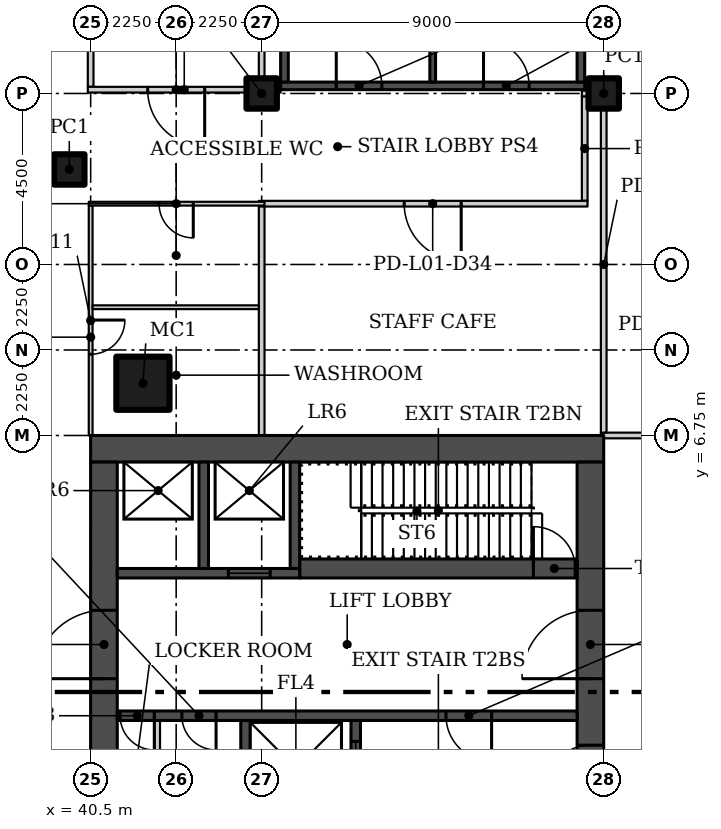
"""IFC4 building model, lengths in metres.
Left out: names, types, materials, properties, quantities, classifications, styles, units other than length and angle.
Written with IfcOpenShell. Run it as: python <this file> out.ifc"""

import sys

from ifc_helpers import new_model, si_unit, direction, frame, frame_2d, origin, origin_2d, place, context, subcontext, project, spatial, rectangle, hollow_rectangle, extrude, element, fill, save


model = new_model("IFC4")
c1 = context("Model", 3, precision=1e-05, world=origin(), true_north=direction((0.0, 1.0)))
c2 = subcontext(c1, "Body", "Model", "MODEL_VIEW")
j1 = project(units=[si_unit("LENGTHUNIT", "METRE"), si_unit("PLANEANGLEUNIT", "RADIAN")], contexts=[c1])
p1 = place(None, origin())
s1 = spatial("IfcSite", under=j1, at=p1, CompositionType="ELEMENT")
p2 = place(p1, origin())
s2 = spatial("IfcBuilding", under=s1, at=p2, CompositionType="ELEMENT")
p3 = place(p2, frame((0.0, 0.0, 6.5)))
s3 = spatial("IfcBuildingStorey", under=s2, at=p3, CompositionType="ELEMENT", Elevation=6.5)
p4 = place(p3, frame((41.875, 8.125, 0.0)))
e1 = element("IfcColumn", 1, at=p4, inside=s3, PredefinedType="COLUMN", context=c2, shape_type="SweptSolid", body=[
    extrude(hollow_rectangle(XDim=1.4, YDim=1.4, WallThickness=0.06, at=origin_2d()), origin(), (0.0, 0.0, 1.0), 5.6),
])
for number, where in (
    (2, (39.938, 13.75, 0.0)),
    (3, (45.0, 15.75, 0.0)),
    (4, (54.0, 15.75, 0.0)),
):
    element("IfcColumn", number, at=place(p3, frame(where)), inside=s3, PredefinedType="COLUMN", context=c2, shape_type="SweptSolid", body=[
        extrude(hollow_rectangle(XDim=0.8, YDim=0.8, WallThickness=0.03, at=origin_2d()), origin(), (0.0, 0.0, 1.0), 5.6),
    ])
p5 = place(p3, frame((40.5, 15.925, 0.0), z_axis=(0.0, 0.0, 1.0), x_axis=(0.0, 1.0, 0.0)))
e5 = element("IfcWall", 5, at=p5, inside=s3, PredefinedType="PARTITIONING", context=c2, shape_type="SweptSolid", body=[
    extrude(rectangle(XDim=17.73, YDim=0.15, at=frame_2d((8.865, 0.0))), origin(), (0.0, 0.0, 1.0), 5.6),
])
p6 = place(p5, frame((13.175, 0.0, 0.0)))
e6 = element("IfcOpeningElement", 6, at=p6, cuts=e5, PredefinedType="OPENING", context=c2, shape_type="SweptSolid", body=[
    extrude(rectangle(XDim=1.5, YDim=2.1, at=frame_2d((0.75, 1.05))), frame((0.0, 0.085, 0.0), z_axis=(0.0, -1.0, 0.0), x_axis=(1.0, 0.0, 0.0)), (0.0, 0.0, 1.0), 0.17),
])
p7 = place(p3, frame((40.5, 12.8, 0.0), z_axis=(0.0, 0.0, 1.0), x_axis=(0.0, -1.0, 0.0)))
e7 = element("IfcWall", 7, at=p7, inside=s3, PredefinedType="PARTITIONING", context=c2, shape_type="SweptSolid", body=[
    extrude(rectangle(XDim=6.05, YDim=0.1, at=frame_2d((3.025, 0.0))), origin(), (0.0, 0.0, 1.0), 5.6),
])
p8 = place(p7, frame((3.012, 0.0, 0.0)))
e8 = element("IfcOpeningElement", 8, at=p8, cuts=e7, PredefinedType="OPENING", context=c2, shape_type="SweptSolid", body=[
    extrude(rectangle(XDim=0.9, YDim=2.1, at=frame_2d((0.45, 1.05))), frame((0.0, 0.06, 0.0), z_axis=(0.0, -1.0, 0.0), x_axis=(1.0, 0.0, 0.0)), (0.0, 0.0, 1.0), 0.12),
])
p9 = place(p3, frame((62.905, 6.75, 0.0), z_axis=(0.0, 0.0, 1.0), x_axis=(-1.0, 0.0, 0.0)))
e9 = element("IfcWall", 9, at=p9, inside=s3, PredefinedType="PARTITIONING", context=c2, shape_type="SweptSolid", body=[
    extrude(rectangle(XDim=8.98, YDim=0.15, at=frame_2d((4.49, 0.0))), origin(), (0.0, 0.0, 1.0), 5.6),
])
p10 = place(p9, frame((2.755, 0.0, 0.0)))
e10 = element("IfcOpeningElement", 10, at=p10, cuts=e9, PredefinedType="OPENING", context=c2, shape_type="SweptSolid", body=[
    extrude(rectangle(XDim=1.8, YDim=2.4, at=frame_2d((0.9, 1.2))), frame((0.0, 0.085, 0.0), z_axis=(0.0, -1.0, 0.0), x_axis=(1.0, 0.0, 0.0)), (0.0, 0.0, 1.0), 0.17),
])
p11 = place(p9, frame((6.055, 0.0, 0.0)))
e11 = element("IfcOpeningElement", 11, at=p11, cuts=e9, PredefinedType="OPENING", context=c2, shape_type="SweptSolid", body=[
    extrude(rectangle(XDim=1.8, YDim=2.4, at=frame_2d((0.9, 1.2))), frame((0.0, 0.085, 0.0), z_axis=(0.0, -1.0, 0.0), x_axis=(1.0, 0.0, 0.0)), (0.0, 0.0, 1.0), 0.17),
])
p12 = place(p3, frame((45.5, 15.85, 0.0), z_axis=(0.0, 0.0, 1.0), x_axis=(-1.0, 0.0, 0.0)))
e12 = element("IfcWall", 12, at=p12, inside=s3, PredefinedType="PARTITIONING", context=c2, shape_type="SweptSolid", body=[
    extrude(rectangle(XDim=5.075, YDim=0.15, at=frame_2d((2.538, 0.0))), origin(), (0.0, 0.0, 1.0), 5.6),
])
p13 = place(p12, frame((2.0, 0.0, 0.0)))
e13 = element("IfcOpeningElement", 13, at=p13, cuts=e12, PredefinedType="OPENING", context=c2, shape_type="SweptSolid", body=[
    extrude(rectangle(XDim=1.5, YDim=2.1, at=frame_2d((0.75, 1.05))), frame((0.0, 0.085, 0.0), z_axis=(0.0, -1.0, 0.0), x_axis=(1.0, 0.0, 0.0)), (0.0, 0.0, 1.0), 0.17),
])
p14 = place(p3, frame((53.5, 15.675, 0.0), z_axis=(0.0, 0.0, 1.0), x_axis=(0.0, -1.0, 0.0)))
e14 = element("IfcWall", 14, at=p14, inside=s3, PredefinedType="PARTITIONING", context=c2, shape_type="SweptSolid", body=[
    extrude(rectangle(XDim=2.75, YDim=0.15, at=frame_2d((1.375, 0.0))), origin(), (0.0, 0.0, 1.0), 5.6),
])
p15 = place(p3, frame((53.575, 12.85, 0.0), z_axis=(0.0, 0.0, 1.0), x_axis=(-1.0, 0.0, 0.0)))
e15 = element("IfcWall", 15, at=p15, inside=s3, PredefinedType="PARTITIONING", context=c2, shape_type="SweptSolid", body=[
    extrude(rectangle(XDim=8.65, YDim=0.15, at=frame_2d((4.325, 0.0))), origin(), (0.0, 0.0, 1.0), 5.6),
])
p16 = place(p15, frame((3.325, 0.0, 0.0)))
e16 = element("IfcOpeningElement", 16, at=p16, cuts=e15, PredefinedType="OPENING", context=c2, shape_type="SweptSolid", body=[
    extrude(rectangle(XDim=1.5, YDim=2.1, at=frame_2d((0.75, 1.05))), frame((0.0, 0.085, 0.0), z_axis=(0.0, -1.0, 0.0), x_axis=(1.0, 0.0, 0.0)), (0.0, 0.0, 1.0), 0.17),
])
p17 = place(p3, frame((45.075, 12.85, 0.0), z_axis=(0.0, 0.0, 1.0), x_axis=(-1.0, 0.0, 0.0)))
e17 = element("IfcWall", 17, at=p17, inside=s3, PredefinedType="PARTITIONING", context=c2, shape_type="SweptSolid", body=[
    extrude(rectangle(XDim=4.625, YDim=0.1, at=frame_2d((2.312, 0.0))), origin(), (0.0, 0.0, 1.0), 5.6),
])
p18 = place(p17, frame((1.875, 0.0, 0.0)))
e18 = element("IfcOpeningElement", 18, at=p18, cuts=e17, PredefinedType="OPENING", context=c2, shape_type="SweptSolid", body=[
    extrude(rectangle(XDim=0.9, YDim=2.1, at=frame_2d((0.45, 1.05))), frame((0.0, 0.06, 0.0), z_axis=(0.0, -1.0, 0.0), x_axis=(1.0, 0.0, 0.0)), (0.0, 0.0, 1.0), 0.12),
])
p19 = place(p3, frame((53.425, 15.75, 0.0)))
e19 = element("IfcWall", 19, at=p19, inside=s3, PredefinedType="PARTITIONING", context=c2, shape_type="SweptSolid", body=[
    extrude(rectangle(XDim=0.65, YDim=0.15, at=frame_2d((0.325, 0.0))), origin(), (0.0, 0.0, 1.0), 5.6),
])
p20 = place(p3, frame((54.0, 15.675, 0.0), z_axis=(0.0, 0.0, 1.0), x_axis=(0.0, -1.0, 0.0)))
e20 = element("IfcWall", 20, at=p20, inside=s3, PredefinedType="PARTITIONING", context=c2, shape_type="SweptSolid", body=[
    extrude(rectangle(XDim=8.85, YDim=0.15, at=frame_2d((4.425, 0.0))), origin(), (0.0, 0.0, 1.0), 5.6),
])
p21 = place(p3, frame((45.0, 33.655, 0.0), z_axis=(0.0, 0.0, 1.0), x_axis=(0.0, -1.0, 0.0)))
e21 = element("IfcWall", 21, at=p21, inside=s3, PredefinedType="PARTITIONING", context=c2, shape_type="SweptSolid", body=[
    extrude(rectangle(XDim=17.73, YDim=0.15, at=frame_2d((8.865, 0.0))), origin(), (0.0, 0.0, 1.0), 5.6),
])
p22 = place(p3, frame((45.0, 12.775, 0.0), z_axis=(0.0, 0.0, 1.0), x_axis=(0.0, -1.0, 0.0)))
e22 = element("IfcWall", 22, at=p22, inside=s3, PredefinedType="PARTITIONING", context=c2, shape_type="SweptSolid", body=[
    extrude(rectangle(XDim=6.025, YDim=0.15, at=frame_2d((3.012, 0.0))), origin(), (0.0, 0.0, 1.0), 5.6),
])
p23 = place(p3, frame((44.925, 10.125, 0.0), z_axis=(0.0, 0.0, 1.0), x_axis=(-1.0, 0.0, 0.0)))
e23 = element("IfcWall", 23, at=p23, inside=s3, PredefinedType="PARTITIONING", context=c2, shape_type="SweptSolid", body=[
    extrude(rectangle(XDim=4.375, YDim=0.1, at=frame_2d((2.188, 0.0))), origin(), (0.0, 0.0, 1.0), 5.6),
])
p24 = place(p3, frame((54.0, 6.4, 0.0), z_axis=(0.0, 0.0, 1.0), x_axis=(-1.0, 0.0, 0.0)))
e24 = element("IfcWall", 24, at=p24, inside=s3, PredefinedType="SHEAR", context=c2, shape_type="SweptSolid", body=[
    extrude(rectangle(XDim=13.5, YDim=0.7, at=frame_2d((6.75, 0.0))), origin(), (0.0, 0.0, 1.0), 5.6),
])
p25 = place(p3, frame((53.65, -6.05, 0.0), z_axis=(0.0, 0.0, 1.0), x_axis=(0.0, 1.0, 0.0)))
e25 = element("IfcWall", 25, at=p25, inside=s3, PredefinedType="SHEAR", context=c2, shape_type="SweptSolid", body=[
    extrude(rectangle(XDim=12.1, YDim=0.7, at=frame_2d((6.05, 0.0))), origin(), (0.0, 0.0, 1.0), 5.6),
])
p26 = place(p25, frame((3.45, 0.0, 0.0)))
e26 = element("IfcOpeningElement", 26, at=p26, cuts=e25, PredefinedType="OPENING", context=c2, shape_type="SweptSolid", body=[
    extrude(rectangle(XDim=1.2, YDim=2.1, at=frame_2d((0.6, 1.05))), frame((0.0, 0.36, 0.0), z_axis=(0.0, -1.0, 0.0), x_axis=(1.0, 0.0, 0.0)), (0.0, 0.0, 1.0), 0.72),
])
p27 = place(p25, frame((6.4, 0.0, 0.0)))
e27 = element("IfcOpeningElement", 27, at=p27, cuts=e25, PredefinedType="OPENING", context=c2, shape_type="SweptSolid", body=[
    extrude(rectangle(XDim=1.8, YDim=2.4, at=frame_2d((0.9, 1.2))), frame((0.0, 0.36, 0.0), z_axis=(0.0, -1.0, 0.0), x_axis=(1.0, 0.0, 0.0)), (0.0, 0.0, 1.0), 0.72),
])
p28 = place(p3, frame((40.85, -6.05, 0.0), z_axis=(0.0, 0.0, 1.0), x_axis=(0.0, 1.0, 0.0)))
e28 = element("IfcWall", 28, at=p28, inside=s3, PredefinedType="SHEAR", context=c2, shape_type="SweptSolid", body=[
    extrude(rectangle(XDim=12.1, YDim=0.7, at=frame_2d((6.05, 0.0))), origin(), (0.0, 0.0, 1.0), 5.6),
])
p29 = place(p28, frame((0.8, 0.0, 0.0)))
e29 = element("IfcOpeningElement", 29, at=p29, cuts=e28, PredefinedType="OPENING", context=c2, shape_type="SweptSolid", body=[
    extrude(rectangle(XDim=1.2, YDim=2.1, at=frame_2d((0.6, 1.05))), frame((0.0, 0.36, 0.0), z_axis=(0.0, -1.0, 0.0), x_axis=(1.0, 0.0, 0.0)), (0.0, 0.0, 1.0), 0.72),
])
p30 = place(p28, frame((6.4, 0.0, 0.0)))
e30 = element("IfcOpeningElement", 30, at=p30, cuts=e28, PredefinedType="OPENING", context=c2, shape_type="SweptSolid", body=[
    extrude(rectangle(XDim=1.8, YDim=2.4, at=frame_2d((0.9, 1.2))), frame((0.0, 0.36, 0.0), z_axis=(0.0, -1.0, 0.0), x_axis=(1.0, 0.0, 0.0)), (0.0, 0.0, 1.0), 0.72),
])
p31 = place(p3, frame((53.3, -0.625, 0.0), z_axis=(0.0, 0.0, 1.0), x_axis=(-1.0, 0.0, 0.0)))
e31 = element("IfcWall", 31, at=p31, inside=s3, PredefinedType="SHEAR", context=c2, shape_type="SweptSolid", body=[
    extrude(rectangle(XDim=12.1, YDim=0.25, at=frame_2d((6.05, 0.0))), origin(), (0.0, 0.0, 1.0), 5.6),
])
p32 = place(p31, frame((2.25, 0.0, 0.0)))
e32 = element("IfcOpeningElement", 32, at=p32, cuts=e31, PredefinedType="OPENING", context=c2, shape_type="SweptSolid", body=[
    extrude(rectangle(XDim=1.2, YDim=2.1, at=frame_2d((0.6, 1.05))), frame((0.0, 0.135, 0.0), z_axis=(0.0, -1.0, 0.0), x_axis=(1.0, 0.0, 0.0)), (0.0, 0.0, 1.0), 0.27),
])
p33 = place(p31, frame((9.5, 0.0, 0.0)))
e33 = element("IfcOpeningElement", 33, at=p33, cuts=e31, PredefinedType="OPENING", context=c2, shape_type="SweptSolid", body=[
    extrude(rectangle(XDim=0.9, YDim=2.1, at=frame_2d((0.45, 1.05))), frame((0.0, 0.135, 0.0), z_axis=(0.0, -1.0, 0.0), x_axis=(1.0, 0.0, 0.0)), (0.0, 0.0, 1.0), 0.27),
])
p34 = place(p31, frame((11.125, 0.0, 0.0)))
e34 = element("IfcOpeningElement", 34, at=p34, cuts=e31, PredefinedType="OPENING", context=c2, shape_type="SweptSolid", body=[
    extrude(rectangle(XDim=0.9, YDim=2.1, at=frame_2d((0.45, 1.05))), frame((0.0, 0.135, 0.0), z_axis=(0.0, -1.0, 0.0), x_axis=(1.0, 0.0, 0.0)), (0.0, 0.0, 1.0), 0.27),
])
p35 = place(p3, frame((47.475, -3.25, 0.0), z_axis=(0.0, 0.0, 1.0), x_axis=(0.0, 1.0, 0.0)))
e35 = element("IfcWall", 35, at=p35, inside=s3, PredefinedType="SHEAR", context=c2, shape_type="SweptSolid", body=[
    extrude(rectangle(XDim=2.5, YDim=0.25, at=frame_2d((1.25, 0.0))), origin(), (0.0, 0.0, 1.0), 5.6),
])
p36 = place(p35, frame((0.55, 0.0, 0.0)))
e36 = element("IfcOpeningElement", 36, at=p36, cuts=e35, PredefinedType="OPENING", context=c2, shape_type="SweptSolid", body=[
    extrude(rectangle(XDim=1.4, YDim=2.4, at=frame_2d((0.7, 1.2))), frame((0.0, 0.135, 0.0), z_axis=(0.0, -1.0, 0.0), x_axis=(1.0, 0.0, 0.0)), (0.0, 0.0, 1.0), 0.27),
])
p37 = place(p3, frame((44.575, -3.25, 0.0), z_axis=(0.0, 0.0, 1.0), x_axis=(0.0, 1.0, 0.0)))
e37 = element("IfcWall", 37, at=p37, inside=s3, PredefinedType="SHEAR", context=c2, shape_type="SweptSolid", body=[
    extrude(rectangle(XDim=2.5, YDim=0.25, at=frame_2d((1.25, 0.0))), origin(), (0.0, 0.0, 1.0), 5.6),
])
p38 = place(p3, frame((42.25, -3.25, 0.0), z_axis=(0.0, 0.0, 1.0), x_axis=(0.0, 1.0, 0.0)))
e38 = element("IfcWall", 38, at=p38, inside=s3, PredefinedType="PARTITIONING", context=c2, shape_type="SweptSolid", body=[
    extrude(rectangle(XDim=2.5, YDim=0.15, at=frame_2d((1.25, 0.0))), origin(), (0.0, 0.0, 1.0), 5.6),
])
p39 = place(p3, frame((46.0, 3.25, 0.0)))
e39 = element("IfcWall", 39, at=p39, inside=s3, PredefinedType="SHEAR", context=c2, shape_type="SweptSolid", body=[
    extrude(rectangle(XDim=7.3, YDim=0.5, at=frame_2d((3.65, 0.0))), origin(), (0.0, 0.0, 1.0), 5.6),
])
p40 = place(p39, frame((6.15, 0.0, 0.0)))
e40 = element("IfcOpeningElement", 40, at=p40, cuts=e39, PredefinedType="OPENING", context=c2, shape_type="SweptSolid", body=[
    extrude(rectangle(XDim=1.1, YDim=2.1, at=frame_2d((0.55, 1.05))), frame((0.0, 0.26, 0.0), z_axis=(0.0, -1.0, 0.0), x_axis=(1.0, 0.0, 0.0)), (0.0, 0.0, 1.0), 0.52),
])
p41 = place(p3, frame((46.0, 3.125, 0.0), z_axis=(0.0, 0.0, 1.0), x_axis=(-1.0, 0.0, 0.0)))
e41 = element("IfcWall", 41, at=p41, inside=s3, PredefinedType="SHEAR", context=c2, shape_type="SweptSolid", body=[
    extrude(rectangle(XDim=4.8, YDim=0.25, at=frame_2d((2.4, 0.0))), origin(), (0.0, 0.0, 1.0), 5.6),
])
p42 = place(p41, frame((0.775, 0.0, 0.0)))
e42 = element("IfcOpeningElement", 42, at=p42, cuts=e41, PredefinedType="OPENING", context=c2, shape_type="SweptSolid", body=[
    extrude(rectangle(XDim=1.1, YDim=2.1, at=frame_2d((0.55, 1.05))), frame((0.0, 0.135, 0.0), z_axis=(0.0, -1.0, 0.0), x_axis=(1.0, 0.0, 0.0)), (0.0, 0.0, 1.0), 0.27),
])
for number, where, z_axis, x_axis in (
    (43, (45.875, 3.25, 0.0), (0.0, 0.0, 1.0), (0.0, 1.0, 0.0)),
    (44, (43.475, 3.25, 0.0), (0.0, 0.0, 1.0), (0.0, 1.0, 0.0)),
):
    element("IfcWall", number, at=place(p3, frame(where, z_axis=z_axis, x_axis=x_axis)), inside=s3, PredefinedType="SHEAR", context=c2, shape_type="SweptSolid", body=[
        extrude(rectangle(XDim=2.8, YDim=0.25, at=frame_2d((1.4, 0.0))), origin(), (0.0, 0.0, 1.0), 5.6),
    ])
p43 = place(p3, frame((45.5, 15.95, 0.0)))
e45 = element("IfcWall", 45, at=p43, inside=s3, PredefinedType="SHEAR", context=c2, shape_type="SweptSolid", body=[
    extrude(rectangle(XDim=8.0, YDim=0.2, at=frame_2d((4.0, 0.0))), origin(), (0.0, 0.0, 1.0), 5.6),
])
p44 = place(p43, frame((1.462, 0.0, 0.0)))
e46 = element("IfcOpeningElement", 46, at=p44, cuts=e45, PredefinedType="OPENING", context=c2, shape_type="SweptSolid", body=[
    extrude(rectangle(XDim=1.2, YDim=2.4, at=frame_2d((0.6, 1.2))), frame((0.0, 0.11, 0.0), z_axis=(0.0, -1.0, 0.0), x_axis=(1.0, 0.0, 0.0)), (0.0, 0.0, 1.0), 0.22),
])
p45 = place(p43, frame((5.337, 0.0, 0.0)))
e47 = element("IfcOpeningElement", 47, at=p45, cuts=e45, PredefinedType="OPENING", context=c2, shape_type="SweptSolid", body=[
    extrude(rectangle(XDim=1.2, YDim=2.4, at=frame_2d((0.6, 1.2))), frame((0.0, 0.11, 0.0), z_axis=(0.0, -1.0, 0.0), x_axis=(1.0, 0.0, 0.0)), (0.0, 0.0, 1.0), 0.22),
])
for number, where, z_axis, x_axis in (
    (48, (45.6, 16.05, 0.0), (0.0, 0.0, 1.0), (0.0, 1.0, 0.0)),
    (49, (53.4, 16.05, 0.0), (0.0, 0.0, 1.0), (0.0, 1.0, 0.0)),
):
    element("IfcWall", number, at=place(p3, frame(where, z_axis=z_axis, x_axis=x_axis)), inside=s3, PredefinedType="SHEAR", context=c2, shape_type="SweptSolid", body=[
        extrude(rectangle(XDim=8.4, YDim=0.2, at=frame_2d((4.2, 0.0))), origin(), (0.0, 0.0, 1.0), 5.6),
    ])
p46 = place(p3, frame((49.5, 16.05, 0.0), z_axis=(0.0, 0.0, 1.0), x_axis=(0.0, 1.0, 0.0)))
e50 = element("IfcWall", 50, at=p46, inside=s3, PredefinedType="SHEAR", context=c2, shape_type="SweptSolid", body=[
    extrude(rectangle(XDim=8.4, YDim=0.15, at=frame_2d((4.2, 0.0))), origin(), (0.0, 0.0, 1.0), 5.6),
])
p47 = place(p8, origin())
e51 = element("IfcDoor", 51, at=p47, inside=s3, OperationType="SINGLE_SWING_LEFT", PredefinedType="DOOR", context=c2, shape_type="SweptSolid", body=[
    extrude(rectangle(XDim=0.9, YDim=2.1, at=frame_2d((0.45, 1.05))), frame((0.0, 0.025, 0.0), z_axis=(0.0, -1.0, 0.0), x_axis=(1.0, 0.0, 0.0)), (0.0, 0.0, 1.0), 0.05),
])
fill(e8, e51)
p48 = place(p18, origin())
e52 = element("IfcDoor", 52, at=p48, inside=s3, OperationType="SINGLE_SWING_LEFT", PredefinedType="DOOR", context=c2, shape_type="SweptSolid", body=[
    extrude(rectangle(XDim=0.9, YDim=2.1, at=frame_2d((0.45, 1.05))), frame((0.0, 0.025, 0.0), z_axis=(0.0, -1.0, 0.0), x_axis=(1.0, 0.0, 0.0)), (0.0, 0.0, 1.0), 0.05),
])
fill(e18, e52)
p49 = place(p13, origin())
e53 = element("IfcDoor", 53, at=p49, inside=s3, OperationType="DOUBLE_DOOR_SINGLE_SWING", PredefinedType="DOOR", context=c2, shape_type="SweptSolid", body=[
    extrude(rectangle(XDim=1.5, YDim=2.1, at=frame_2d((0.75, 1.05))), frame((0.0, 0.025, 0.0), z_axis=(0.0, -1.0, 0.0), x_axis=(1.0, 0.0, 0.0)), (0.0, 0.0, 1.0), 0.05),
])
fill(e13, e53)
p50 = place(p16, origin())
e54 = element("IfcDoor", 54, at=p50, inside=s3, OperationType="DOUBLE_DOOR_SINGLE_SWING", PredefinedType="DOOR", context=c2, shape_type="SweptSolid", body=[
    extrude(rectangle(XDim=1.5, YDim=2.1, at=frame_2d((0.75, 1.05))), frame((0.0, 0.025, 0.0), z_axis=(0.0, -1.0, 0.0), x_axis=(1.0, 0.0, 0.0)), (0.0, 0.0, 1.0), 0.05),
])
fill(e16, e54)
p51 = place(p26, origin())
e55 = element("IfcDoor", 55, at=p51, inside=s3, OperationType="SINGLE_SWING_LEFT", PredefinedType="DOOR", context=c2, shape_type="SweptSolid", body=[
    extrude(rectangle(XDim=1.2, YDim=2.1, at=frame_2d((0.6, 1.05))), frame((0.0, 0.025, 0.0), z_axis=(0.0, -1.0, 0.0), x_axis=(1.0, 0.0, 0.0)), (0.0, 0.0, 1.0), 0.05),
])
fill(e26, e55)
p52 = place(p27, origin())
e56 = element("IfcDoor", 56, at=p52, inside=s3, OperationType="DOUBLE_DOOR_SINGLE_SWING", PredefinedType="DOOR", context=c2, shape_type="SweptSolid", body=[
    extrude(rectangle(XDim=1.8, YDim=2.4, at=frame_2d((0.9, 1.2))), frame((0.0, 0.025, 0.0), z_axis=(0.0, -1.0, 0.0), x_axis=(1.0, 0.0, 0.0)), (0.0, 0.0, 1.0), 0.05),
])
fill(e27, e56)
p53 = place(p30, origin())
e57 = element("IfcDoor", 57, at=p53, inside=s3, OperationType="DOUBLE_DOOR_SINGLE_SWING", PredefinedType="DOOR", context=c2, shape_type="SweptSolid", body=[
    extrude(rectangle(XDim=1.8, YDim=2.4, at=frame_2d((0.9, 1.2))), frame((0.0, 0.025, 0.0), z_axis=(0.0, -1.0, 0.0), x_axis=(1.0, 0.0, 0.0)), (0.0, 0.0, 1.0), 0.05),
])
fill(e30, e57)
p54 = place(p32, origin())
e58 = element("IfcDoor", 58, at=p54, inside=s3, OperationType="SINGLE_SWING_LEFT", PredefinedType="DOOR", context=c2, shape_type="SweptSolid", body=[
    extrude(rectangle(XDim=1.2, YDim=2.1, at=frame_2d((0.6, 1.05))), frame((0.0, 0.025, 0.0), z_axis=(0.0, -1.0, 0.0), x_axis=(1.0, 0.0, 0.0)), (0.0, 0.0, 1.0), 0.05),
])
fill(e32, e58)
p55 = place(p33, origin())
e59 = element("IfcDoor", 59, at=p55, inside=s3, OperationType="SINGLE_SWING_RIGHT", PredefinedType="DOOR", context=c2, shape_type="SweptSolid", body=[
    extrude(rectangle(XDim=0.9, YDim=2.1, at=frame_2d((0.45, 1.05))), frame((0.0, 0.025, 0.0), z_axis=(0.0, -1.0, 0.0), x_axis=(1.0, 0.0, 0.0)), (0.0, 0.0, 1.0), 0.05),
])
fill(e33, e59)
p56 = place(p34, origin())
e60 = element("IfcDoor", 60, at=p56, inside=s3, OperationType="SINGLE_SWING_RIGHT", PredefinedType="DOOR", context=c2, shape_type="SweptSolid", body=[
    extrude(rectangle(XDim=0.9, YDim=2.1, at=frame_2d((0.45, 1.05))), frame((0.0, 0.025, 0.0), z_axis=(0.0, -1.0, 0.0), x_axis=(1.0, 0.0, 0.0)), (0.0, 0.0, 1.0), 0.05),
])
fill(e34, e60)
p57 = place(p36, origin())
e61 = element("IfcDoor", 61, at=p57, inside=s3, OperationType="SLIDING_TO_LEFT", PredefinedType="DOOR", context=c2, shape_type="SweptSolid", body=[
    extrude(rectangle(XDim=1.4, YDim=2.4, at=frame_2d((0.7, 1.2))), frame((0.0, 0.025, 0.0), z_axis=(0.0, -1.0, 0.0), x_axis=(1.0, 0.0, 0.0)), (0.0, 0.0, 1.0), 0.05),
])
fill(e36, e61)
p58 = place(p40, origin())
e62 = element("IfcDoor", 62, at=p58, inside=s3, OperationType="SINGLE_SWING_RIGHT", PredefinedType="DOOR", context=c2, shape_type="SweptSolid", body=[
    extrude(rectangle(XDim=1.1, YDim=2.1, at=frame_2d((0.55, 1.05))), frame((0.0, 0.025, 0.0), z_axis=(0.0, -1.0, 0.0), x_axis=(1.0, 0.0, 0.0)), (0.0, 0.0, 1.0), 0.05),
])
fill(e40, e62)
p59 = place(p42, origin())
e63 = element("IfcDoor", 63, at=p59, inside=s3, OperationType="SLIDING_TO_LEFT", PredefinedType="DOOR", context=c2, shape_type="SweptSolid", body=[
    extrude(rectangle(XDim=1.1, YDim=2.1, at=frame_2d((0.55, 1.05))), frame((0.0, 0.025, 0.0), z_axis=(0.0, -1.0, 0.0), x_axis=(1.0, 0.0, 0.0)), (0.0, 0.0, 1.0), 0.05),
])
fill(e42, e63)
p60 = place(p44, origin())
e64 = element("IfcDoor", 64, at=p60, inside=s3, OperationType="SINGLE_SWING_LEFT", PredefinedType="DOOR", context=c2, shape_type="SweptSolid", body=[
    extrude(rectangle(XDim=1.2, YDim=2.4, at=frame_2d((0.6, 1.2))), frame((0.0, 0.025, 0.0), z_axis=(0.0, -1.0, 0.0), x_axis=(1.0, 0.0, 0.0)), (0.0, 0.0, 1.0), 0.05),
])
fill(e46, e64)
p61 = place(p45, origin())
e65 = element("IfcDoor", 65, at=p61, inside=s3, OperationType="SINGLE_SWING_RIGHT", PredefinedType="DOOR", context=c2, shape_type="SweptSolid", body=[
    extrude(rectangle(XDim=1.2, YDim=2.4, at=frame_2d((0.6, 1.2))), frame((0.0, 0.025, 0.0), z_axis=(0.0, -1.0, 0.0), x_axis=(1.0, 0.0, 0.0)), (0.0, 0.0, 1.0), 0.05),
])
fill(e47, e65)
save(model, sys.argv[1])
